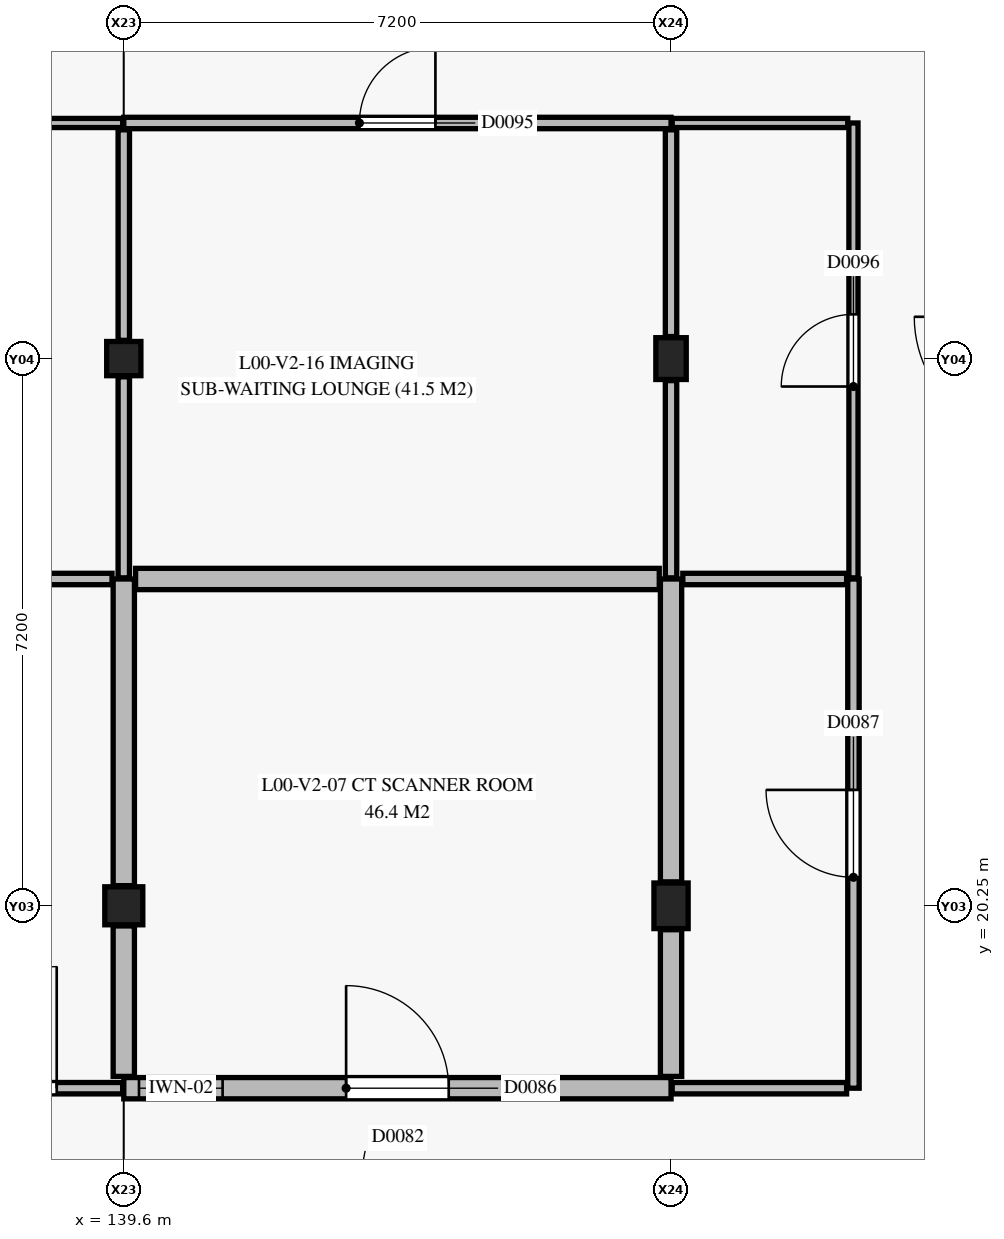
"""IFC4 building model, lengths in metres.
Left out: names, types, materials, properties, quantities, classifications, styles, units other than length and angle.
Written with IfcOpenShell. Run it as: python <this file> out.ifc"""

import sys

from ifc_helpers import new_model, si_unit, direction, frame, frame_2d, origin, origin_2d, place, context, subcontext, project, spatial, rectangle, extrude, element, fill, save


model = new_model("IFC4")
c1 = context("Model", 3, precision=1e-05, world=origin(), true_north=direction((0.0, 1.0)))
c2 = subcontext(c1, "Body", "Model", "MODEL_VIEW")
j1 = project(units=[si_unit("LENGTHUNIT", "METRE"), si_unit("PLANEANGLEUNIT", "RADIAN")], contexts=[c1])
p1 = place(None, origin())
s1 = spatial("IfcSite", under=j1, at=p1, CompositionType="ELEMENT")
p2 = place(p1, origin())
s2 = spatial("IfcBuilding", under=s1, at=p2, CompositionType="ELEMENT")
p3 = place(p2, origin())
s3 = spatial("IfcBuildingStorey", under=s2, at=p3, CompositionType="ELEMENT", Elevation=0.0)
p4 = place(p3, frame((139.6, 20.25, 0.0), z_axis=(0.0, 0.0, 1.0), x_axis=(1.0, 0.0, 0.0)))
e1 = element("IfcColumn", 1, at=p4, inside=s3, PredefinedType="COLUMN", context=c2, shape_type="SweptSolid", body=[
    extrude(rectangle(XDim=0.5, YDim=0.5, at=origin_2d()), origin(), (0.0, 0.0, 1.0), 4.8),
])
p5 = place(p3, frame((139.6, 27.45, 0.0), z_axis=(0.0, 0.0, 1.0), x_axis=(1.0, 0.0, 0.0)))
e2 = element("IfcColumn", 2, at=p5, inside=s3, PredefinedType="COLUMN", context=c2, shape_type="SweptSolid", body=[
    extrude(rectangle(XDim=0.45, YDim=0.45, at=origin_2d()), origin(), (0.0, 0.0, 1.0), 4.8),
])
p6 = place(p3, frame((146.8, 20.25, 0.0), z_axis=(0.0, 0.0, 1.0), x_axis=(1.0, 0.0, 0.0)))
e3 = element("IfcColumn", 3, at=p6, inside=s3, PredefinedType="COLUMN", context=c2, shape_type="SweptSolid", body=[
    extrude(rectangle(XDim=0.45, YDim=0.6, at=origin_2d()), origin(), (0.0, 0.0, 1.0), 4.8),
])
p7 = place(p3, frame((146.8, 27.45, 0.0), z_axis=(0.0, 0.0, 1.0), x_axis=(1.0, 0.0, 0.0)))
e4 = element("IfcColumn", 4, at=p7, inside=s3, PredefinedType="COLUMN", context=c2, shape_type="SweptSolid", body=[
    extrude(rectangle(XDim=0.4, YDim=0.55, at=origin_2d()), origin(), (0.0, 0.0, 1.0), 4.8),
])
p8 = place(p3, frame((139.6, 17.85, 0.0), z_axis=(0.0, 0.0, 1.0), x_axis=(1.0, 0.0, 0.0)))
e5 = element("IfcWall", 5, at=p8, inside=s3, PredefinedType="PARTITIONING", context=c2, shape_type="SweptSolid", body=[
    extrude(rectangle(XDim=7.2, YDim=0.28, at=frame_2d((3.6, 0.0))), origin(), (0.0, 0.0, 1.0), 3.725),
])
p9 = place(p8, frame((2.925, 0.0, 0.0)))
e6 = element("IfcOpeningElement", 6, at=p9, cuts=e5, PredefinedType="OPENING", context=c2, shape_type="SweptSolid", body=[
    extrude(rectangle(XDim=1.35, YDim=2.2, at=frame_2d((0.675, 1.1))), frame((0.0, 0.15, 0.0), z_axis=(0.0, -1.0, 0.0), x_axis=(1.0, 0.0, 0.0)), (0.0, 0.0, 1.0), 0.3),
])
p10 = place(p8, frame((0.2, 0.0, 1.05)))
e7 = element("IfcOpeningElement", 7, at=p10, cuts=e5, PredefinedType="OPENING", context=c2, shape_type="SweptSolid", body=[
    extrude(rectangle(XDim=1.1, YDim=1.1, at=frame_2d((0.55, 0.55))), frame((0.0, 0.15, 0.0), z_axis=(0.0, -1.0, 0.0), x_axis=(1.0, 0.0, 0.0)), (0.0, 0.0, 1.0), 0.3),
])
p11 = place(p3, frame((136.25, 17.85, 0.0), z_axis=(0.0, 0.0, 1.0), x_axis=(1.0, 0.0, 0.0)))
e8 = element("IfcWall", 8, at=p11, inside=s3, PredefinedType="PARTITIONING", context=c2, shape_type="SweptSolid", body=[
    extrude(rectangle(XDim=3.335, YDim=0.15, at=frame_2d((1.667, 0.0))), origin(), (0.0, 0.0, 1.0), 3.725),
])
p12 = place(p11, frame((0.867, 0.0, 0.0)))
e9 = element("IfcOpeningElement", 9, at=p12, cuts=e8, PredefinedType="OPENING", context=c2, shape_type="SweptSolid", body=[
    extrude(rectangle(XDim=1.6, YDim=2.25, at=frame_2d((0.8, 1.125))), frame((0.0, 0.085, 0.0), z_axis=(0.0, -1.0, 0.0), x_axis=(1.0, 0.0, 0.0)), (0.0, 0.0, 1.0), 0.17),
])
p13 = place(p3, frame((149.2, 17.85, 0.0), z_axis=(0.0, 0.0, 1.0), x_axis=(0.0, 1.0, 0.0)))
e10 = element("IfcWall", 10, at=p13, inside=s3, PredefinedType="PARTITIONING", context=c2, shape_type="SweptSolid", body=[
    extrude(rectangle(XDim=6.7, YDim=0.15, at=frame_2d((3.35, 0.0))), origin(), (0.0, 0.0, 1.0), 3.865),
])
p14 = place(p13, frame((2.775, 0.0, 0.0)))
e11 = element("IfcOpeningElement", 11, at=p14, cuts=e10, PredefinedType="OPENING", context=c2, shape_type="SweptSolid", body=[
    extrude(rectangle(XDim=1.15, YDim=2.15, at=frame_2d((0.575, 1.075))), frame((0.0, 0.085, 0.0), z_axis=(0.0, -1.0, 0.0), x_axis=(1.0, 0.0, 0.0)), (0.0, 0.0, 1.0), 0.17),
])
p15 = place(p3, frame((146.815, 17.85, 0.0), z_axis=(0.0, 0.0, 1.0), x_axis=(1.0, 0.0, 0.0)))
e12 = element("IfcWall", 12, at=p15, inside=s3, PredefinedType="PARTITIONING", context=c2, shape_type="SweptSolid", body=[
    extrude(rectangle(XDim=2.295, YDim=0.15, at=frame_2d((1.147, 0.0))), origin(), (0.0, 0.0, 1.0), 3.795),
])
p16 = place(p3, frame((139.6, 30.55, 0.0), z_axis=(0.0, 0.0, 1.0), x_axis=(1.0, 0.0, 0.0)))
e13 = element("IfcWall", 13, at=p16, inside=s3, PredefinedType="PARTITIONING", context=c2, shape_type="SweptSolid", body=[
    extrude(rectangle(XDim=7.2, YDim=0.15, at=frame_2d((3.6, 0.0))), origin(), (0.0, 0.0, 1.0), 3.795),
])
p17 = place(p16, frame((3.1, 0.0, 0.0)))
e14 = element("IfcOpeningElement", 14, at=p17, cuts=e13, PredefinedType="OPENING", context=c2, shape_type="SweptSolid", body=[
    extrude(rectangle(XDim=1.0, YDim=2.15, at=frame_2d((0.5, 1.075))), frame((0.0, 0.085, 0.0), z_axis=(0.0, -1.0, 0.0), x_axis=(1.0, 0.0, 0.0)), (0.0, 0.0, 1.0), 0.17),
])
p18 = place(p3, frame((136.265, 30.55, 0.0), z_axis=(0.0, 0.0, 1.0), x_axis=(1.0, 0.0, 0.0)))
e15 = element("IfcWall", 15, at=p18, inside=s3, PredefinedType="PARTITIONING", context=c2, shape_type="SweptSolid", body=[
    extrude(rectangle(XDim=3.32, YDim=0.12, at=frame_2d((1.66, 0.0))), origin(), (0.0, 0.0, 1.0), 3.795),
])
p19 = place(p18, frame((1.135, 0.0, 0.0)))
e16 = element("IfcOpeningElement", 16, at=p19, cuts=e15, PredefinedType="OPENING", context=c2, shape_type="SweptSolid", body=[
    extrude(rectangle(XDim=1.05, YDim=2.15, at=frame_2d((0.525, 1.075))), frame((0.0, 0.07, 0.0), z_axis=(0.0, -1.0, 0.0), x_axis=(1.0, 0.0, 0.0)), (0.0, 0.0, 1.0), 0.14),
])
p20 = place(p3, frame((149.2, 24.565, 0.0), z_axis=(0.0, 0.0, 1.0), x_axis=(0.0, 1.0, 0.0)))
e17 = element("IfcWall", 17, at=p20, inside=s3, PredefinedType="PARTITIONING", context=c2, shape_type="SweptSolid", body=[
    extrude(rectangle(XDim=5.985, YDim=0.12, at=frame_2d((2.993, 0.0))), origin(), (0.0, 0.0, 1.0), 3.725),
])
p21 = place(p20, frame((2.518, 0.0, 0.0)))
e18 = element("IfcOpeningElement", 18, at=p21, cuts=e17, PredefinedType="OPENING", context=c2, shape_type="SweptSolid", body=[
    extrude(rectangle(XDim=0.95, YDim=2.1, at=frame_2d((0.475, 1.05))), frame((0.0, 0.07, 0.0), z_axis=(0.0, -1.0, 0.0), x_axis=(1.0, 0.0, 0.0)), (0.0, 0.0, 1.0), 0.14),
])
p22 = place(p3, frame((146.815, 30.55, 0.0), z_axis=(0.0, 0.0, 1.0), x_axis=(1.0, 0.0, 0.0)))
e19 = element("IfcWall", 19, at=p22, inside=s3, PredefinedType="PARTITIONING", context=c2, shape_type="SweptSolid", body=[
    extrude(rectangle(XDim=2.31, YDim=0.12, at=frame_2d((1.155, 0.0))), origin(), (0.0, 0.0, 1.0), 3.965),
])
p23 = place(p3, frame((139.6, 18.005, 0.0), z_axis=(0.0, 0.0, 1.0), x_axis=(0.0, 1.0, 0.0)))
e20 = element("IfcWall", 20, at=p23, inside=s3, PredefinedType="PARTITIONING", context=c2, shape_type="SweptSolid", body=[
    extrude(rectangle(XDim=1.98, YDim=0.28, at=frame_2d((0.99, 0.0))), origin(), (0.0, 0.0, 1.0), 3.725),
])
p24 = place(p3, frame((139.6, 20.515, 0.0), z_axis=(0.0, 0.0, 1.0), x_axis=(0.0, 1.0, 0.0)))
e21 = element("IfcWall", 21, at=p24, inside=s3, PredefinedType="PARTITIONING", context=c2, shape_type="SweptSolid", body=[
    extrude(rectangle(XDim=4.035, YDim=0.28, at=frame_2d((2.018, 0.0))), origin(), (0.0, 0.0, 1.0), 3.795),
])
p25 = place(p3, frame((146.8, 18.005, 0.0), z_axis=(0.0, 0.0, 1.0), x_axis=(0.0, 1.0, 0.0)))
e22 = element("IfcWall", 22, at=p25, inside=s3, PredefinedType="PARTITIONING", context=c2, shape_type="SweptSolid", body=[
    extrude(rectangle(XDim=1.93, YDim=0.28, at=frame_2d((0.965, 0.0))), origin(), (0.0, 0.0, 1.0), 3.795),
])
p26 = place(p3, frame((146.8, 20.565, 0.0), z_axis=(0.0, 0.0, 1.0), x_axis=(0.0, 1.0, 0.0)))
e23 = element("IfcWall", 23, at=p26, inside=s3, PredefinedType="PARTITIONING", context=c2, shape_type="SweptSolid", body=[
    extrude(rectangle(XDim=3.985, YDim=0.28, at=frame_2d((1.993, 0.0))), origin(), (0.0, 0.0, 1.0), 3.925),
])
p27 = place(p3, frame((139.755, 24.55, 0.0), z_axis=(0.0, 0.0, 1.0), x_axis=(1.0, 0.0, 0.0)))
e24 = element("IfcWall", 24, at=p27, inside=s3, PredefinedType="PARTITIONING", context=c2, shape_type="SweptSolid", body=[
    extrude(rectangle(XDim=6.89, YDim=0.28, at=frame_2d((3.445, 0.0))), origin(), (0.0, 0.0, 1.0), 4.46),
])
p28 = place(p3, frame((136.34, 24.55, 0.0), z_axis=(0.0, 0.0, 1.0), x_axis=(1.0, 0.0, 0.0)))
e25 = element("IfcWall", 25, at=p28, inside=s3, PredefinedType="PARTITIONING", context=c2, shape_type="SweptSolid", body=[
    extrude(rectangle(XDim=3.105, YDim=0.15, at=frame_2d((1.552, 0.0))), origin(), (0.0, 0.0, 1.0), 4.46),
])
p29 = place(p3, frame((146.955, 24.55, 0.0), z_axis=(0.0, 0.0, 1.0), x_axis=(1.0, 0.0, 0.0)))
e26 = element("IfcWall", 26, at=p29, inside=s3, PredefinedType="PARTITIONING", context=c2, shape_type="SweptSolid", body=[
    extrude(rectangle(XDim=2.155, YDim=0.15, at=frame_2d((1.078, 0.0))), origin(), (0.0, 0.0, 1.0), 4.46),
])
p30 = place(p3, frame((139.6, 24.565, 0.0), z_axis=(0.0, 0.0, 1.0), x_axis=(0.0, 1.0, 0.0)))
e27 = element("IfcWall", 27, at=p30, inside=s3, PredefinedType="PARTITIONING", context=c2, shape_type="SweptSolid", body=[
    extrude(rectangle(XDim=2.645, YDim=0.15, at=frame_2d((1.323, 0.0))), origin(), (0.0, 0.0, 1.0), 3.795),
])
p31 = place(p3, frame((139.6, 27.69, 0.0), z_axis=(0.0, 0.0, 1.0), x_axis=(0.0, 1.0, 0.0)))
e28 = element("IfcWall", 28, at=p31, inside=s3, PredefinedType="PARTITIONING", context=c2, shape_type="SweptSolid", body=[
    extrude(rectangle(XDim=2.77, YDim=0.15, at=frame_2d((1.385, 0.0))), origin(), (0.0, 0.0, 1.0), 3.795),
])
p32 = place(p3, frame((146.8, 24.565, 0.0), z_axis=(0.0, 0.0, 1.0), x_axis=(0.0, 1.0, 0.0)))
e29 = element("IfcWall", 29, at=p32, inside=s3, PredefinedType="PARTITIONING", context=c2, shape_type="SweptSolid", body=[
    extrude(rectangle(XDim=2.595, YDim=0.15, at=frame_2d((1.297, 0.0))), origin(), (0.0, 0.0, 1.0), 3.925),
])
p33 = place(p3, frame((146.8, 27.74, 0.0), z_axis=(0.0, 0.0, 1.0), x_axis=(0.0, 1.0, 0.0)))
e30 = element("IfcWall", 30, at=p33, inside=s3, PredefinedType="PARTITIONING", context=c2, shape_type="SweptSolid", body=[
    extrude(rectangle(XDim=2.72, YDim=0.15, at=frame_2d((1.36, 0.0))), origin(), (0.0, 0.0, 1.0), 3.965),
])
p34 = place(p12, origin())
e31 = element("IfcDoor", 31, at=p34, inside=s3, OperationType="SINGLE_SWING_RIGHT", PredefinedType="DOOR", context=c2, shape_type="SweptSolid", body=[
    extrude(rectangle(XDim=1.6, YDim=2.25, at=frame_2d((0.8, 1.125))), frame((0.0, 0.025, 0.0), z_axis=(0.0, -1.0, 0.0), x_axis=(1.0, 0.0, 0.0)), (0.0, 0.0, 1.0), 0.05),
])
fill(e9, e31)
p35 = place(p9, origin())
e32 = element("IfcDoor", 32, at=p35, inside=s3, OperationType="SINGLE_SWING_LEFT", PredefinedType="DOOR", context=c2, shape_type="SweptSolid", body=[
    extrude(rectangle(XDim=1.35, YDim=2.2, at=frame_2d((0.675, 1.1))), frame((0.0, 0.025, 0.0), z_axis=(0.0, -1.0, 0.0), x_axis=(1.0, 0.0, 0.0)), (0.0, 0.0, 1.0), 0.05),
])
fill(e6, e32)
p36 = place(p10, origin())
e33 = element("IfcWindow", 33, at=p36, inside=s3, PartitioningType="SINGLE_PANEL", PredefinedType="WINDOW", context=c2, shape_type="SweptSolid", body=[
    extrude(rectangle(XDim=1.1, YDim=1.1, at=frame_2d((0.55, 0.55))), frame((0.0, 0.03, 0.0), z_axis=(0.0, -1.0, 0.0), x_axis=(1.0, 0.0, 0.0)), (0.0, 0.0, 1.0), 0.06),
])
fill(e7, e33)
p37 = place(p14, origin())
e34 = element("IfcDoor", 34, at=p37, inside=s3, OperationType="SINGLE_SWING_RIGHT", PredefinedType="DOOR", context=c2, shape_type="SweptSolid", body=[
    extrude(rectangle(XDim=1.15, YDim=2.15, at=frame_2d((0.575, 1.075))), frame((0.0, 0.025, 0.0), z_axis=(0.0, -1.0, 0.0), x_axis=(1.0, 0.0, 0.0)), (0.0, 0.0, 1.0), 0.05),
])
fill(e11, e34)
p38 = place(p17, origin())
e35 = element("IfcDoor", 35, at=p38, inside=s3, OperationType="SINGLE_SWING_RIGHT", PredefinedType="DOOR", context=c2, shape_type="SweptSolid", body=[
    extrude(rectangle(XDim=1.0, YDim=2.15, at=frame_2d((0.5, 1.075))), frame((0.0, 0.025, 0.0), z_axis=(0.0, -1.0, 0.0), x_axis=(1.0, 0.0, 0.0)), (0.0, 0.0, 1.0), 0.05),
])
fill(e14, e35)
p39 = place(p21, origin())
e36 = element("IfcDoor", 36, at=p39, inside=s3, OperationType="SINGLE_SWING_LEFT", PredefinedType="DOOR", context=c2, shape_type="SweptSolid", body=[
    extrude(rectangle(XDim=0.95, YDim=2.1, at=frame_2d((0.475, 1.05))), frame((0.0, 0.025, 0.0), z_axis=(0.0, -1.0, 0.0), x_axis=(1.0, 0.0, 0.0)), (0.0, 0.0, 1.0), 0.05),
])
fill(e18, e36)
save(model, sys.argv[1])
